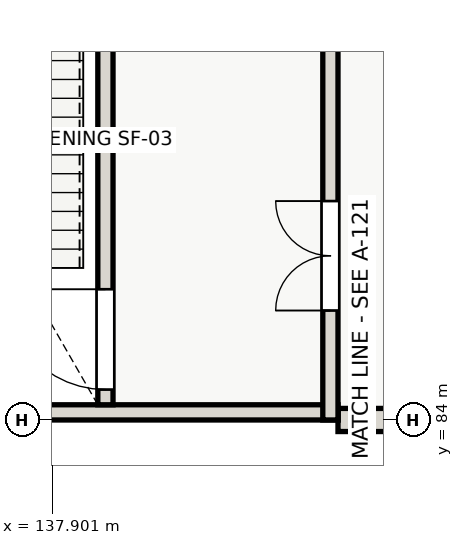
"""IFC4 building model, lengths in metres.
Left out: names, types, materials, properties, quantities, classifications, styles, units other than length and angle.
Written with IfcOpenShell. Run it as: python <this file> out.ifc"""

import sys

from ifc_helpers import new_model, si_unit, direction, frame, frame_2d, origin, place, context, subcontext, project, spatial, rectangle, extrude, element, fill, save


model = new_model("IFC4")
c1 = context("Model", 3, precision=1e-05, world=origin(), true_north=direction((0.0, 1.0)))
c2 = subcontext(c1, "Body", "Model", "MODEL_VIEW")
j1 = project(units=[si_unit("LENGTHUNIT", "METRE"), si_unit("PLANEANGLEUNIT", "RADIAN")], contexts=[c1])
p1 = place(None, origin())
s1 = spatial("IfcSite", under=j1, at=p1, CompositionType="ELEMENT")
p2 = place(p1, origin())
s2 = spatial("IfcBuilding", under=s1, at=p2, CompositionType="ELEMENT")
p3 = place(p2, frame((0.0, 0.0, 4.2)))
s3 = spatial("IfcBuildingStorey", under=s2, at=p3, CompositionType="ELEMENT", Elevation=4.2)
p4 = place(p3, frame((144.0, 84.0, 0.0), z_axis=(0.0, 0.0, 1.0), x_axis=(-1.0, 0.0, 0.0)))
e1 = element("IfcWall", 1, at=p4, inside=s3, PredefinedType="SOLIDWALL", context=c2, shape_type="SweptSolid", body=[
    extrude(rectangle(XDim=1.4, YDim=0.38, at=frame_2d((0.7, 0.0))), origin(), (0.0, 0.0, 1.0), 3.53),
])
p5 = place(p3, frame((142.6, 84.125, 0.0), z_axis=(0.0, 0.0, 1.0), x_axis=(-1.0, 0.0, 0.0)))
e2 = element("IfcWall", 2, at=p5, inside=s3, PredefinedType="SHEAR", context=c2, shape_type="SweptSolid", body=[
    extrude(rectangle(XDim=9.2, YDim=0.25, at=frame_2d((4.6, 0.0))), origin(), (0.0, 0.0, 1.0), 4.2),
])
p6 = place(p3, frame((142.475, 84.0, 0.0), z_axis=(0.0, 0.0, 1.0), x_axis=(0.0, 1.0, 0.0)))
e3 = element("IfcWall", 3, at=p6, inside=s3, PredefinedType="SHEAR", context=c2, shape_type="SweptSolid", body=[
    extrude(rectangle(XDim=9.2, YDim=0.25, at=frame_2d((4.6, 0.0))), origin(), (0.0, 0.0, 1.0), 4.2),
])
p7 = place(p6, frame((1.8, 0.0, 0.0)))
e4 = element("IfcOpeningElement", 4, at=p7, cuts=e3, PredefinedType="OPENING", context=c2, shape_type="SweptSolid", body=[
    extrude(rectangle(XDim=1.8, YDim=2.15, at=frame_2d((0.9, 1.075))), frame((0.0, 0.135, 0.0), z_axis=(0.0, -1.0, 0.0), x_axis=(1.0, 0.0, 0.0)), (0.0, 0.0, 1.0), 0.27),
])
p8 = place(p3, frame((138.775, 84.25, 0.0), z_axis=(0.0, 0.0, 1.0), x_axis=(0.0, 1.0, 0.0)))
e5 = element("IfcWall", 5, at=p8, inside=s3, PredefinedType="SHEAR", context=c2, shape_type="SweptSolid", body=[
    extrude(rectangle(XDim=8.7, YDim=0.25, at=frame_2d((4.35, 0.0))), origin(), (0.0, 0.0, 1.0), 4.2),
])
p9 = place(p8, frame((0.25, 0.0, 0.0)))
e6 = element("IfcOpeningElement", 6, at=p9, cuts=e5, PredefinedType="OPENING", context=c2, shape_type="SweptSolid", body=[
    extrude(rectangle(XDim=1.65, YDim=2.1, at=frame_2d((0.825, 1.05))), frame((0.0, 0.135, 0.0), z_axis=(0.0, -1.0, 0.0), x_axis=(1.0, 0.0, 0.0)), (0.0, 0.0, 1.0), 0.27),
])
p10 = place(p7, origin())
e7 = element("IfcDoor", 7, at=p10, inside=s3, OperationType="DOUBLE_DOOR_SINGLE_SWING", PredefinedType="DOOR", context=c2, shape_type="SweptSolid", body=[
    extrude(rectangle(XDim=1.8, YDim=2.15, at=frame_2d((0.9, 1.075))), frame((0.0, 0.025, 0.0), z_axis=(0.0, -1.0, 0.0), x_axis=(1.0, 0.0, 0.0)), (0.0, 0.0, 1.0), 0.05),
])
fill(e4, e7)
p11 = place(p9, origin())
e8 = element("IfcDoor", 8, at=p11, inside=s3, OperationType="SINGLE_SWING_RIGHT", PredefinedType="DOOR", context=c2, shape_type="SweptSolid", body=[
    extrude(rectangle(XDim=1.65, YDim=2.1, at=frame_2d((0.825, 1.05))), frame((0.0, 0.025, 0.0), z_axis=(0.0, -1.0, 0.0), x_axis=(1.0, 0.0, 0.0)), (0.0, 0.0, 1.0), 0.05),
])
fill(e6, e8)
save(model, sys.argv[1])
